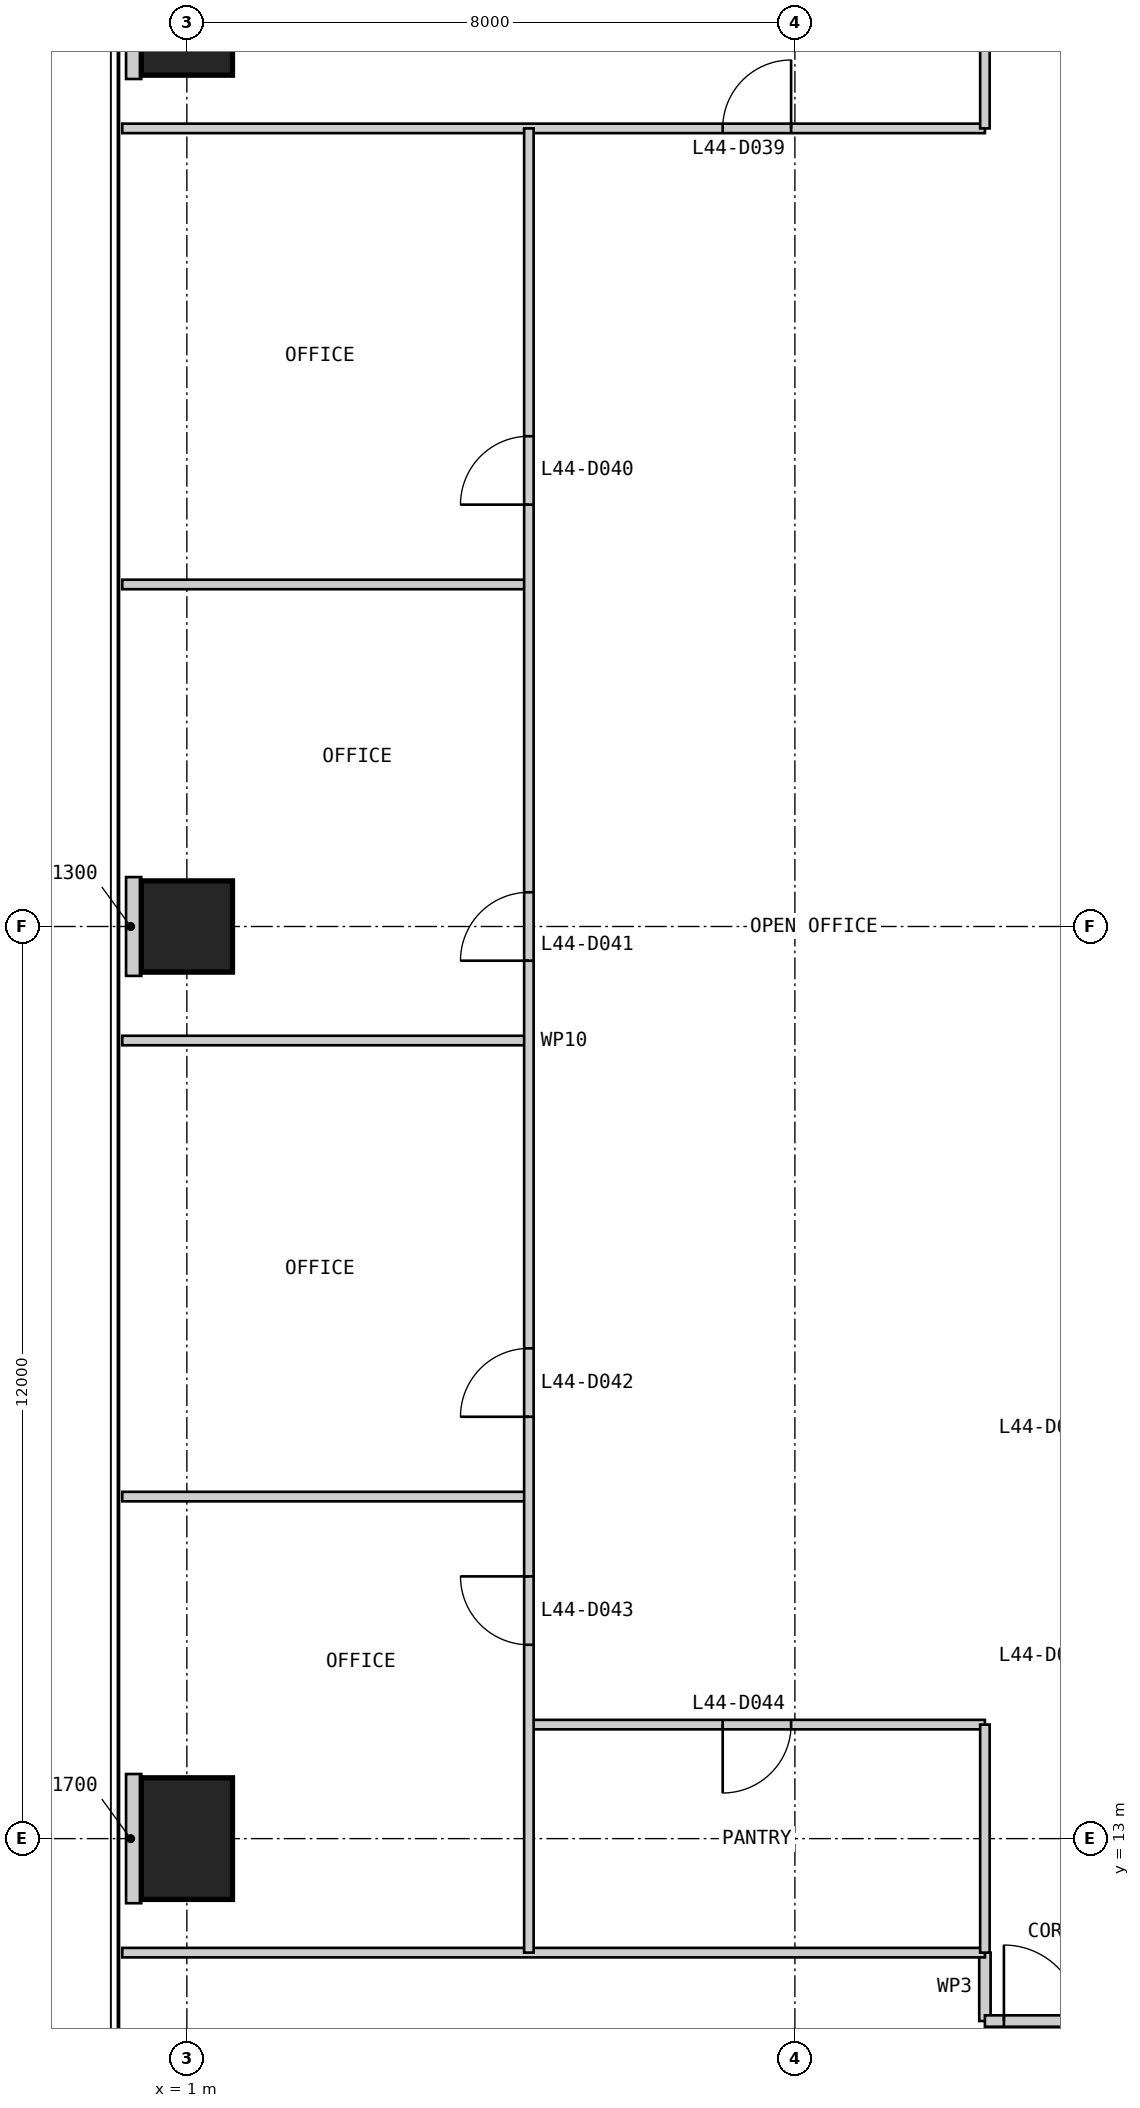
"""IFC4 building model, lengths in metres.
Left out: names, types, materials, properties, quantities, classifications, styles, units other than length and angle.
Written with IfcOpenShell. Run it as: python <this file> out.ifc"""

import sys

from ifc_helpers import new_model, si_unit, direction, frame, frame_2d, origin, origin_2d, place, context, subcontext, project, spatial, rectangle, extrude, element, fill, save


model = new_model("IFC4")
c1 = context("Model", 3, precision=1e-05, world=origin(), true_north=direction((0.0, 1.0)))
c2 = subcontext(c1, "Body", "Model", "MODEL_VIEW")
j1 = project(units=[si_unit("LENGTHUNIT", "METRE"), si_unit("PLANEANGLEUNIT", "RADIAN")], contexts=[c1])
p1 = place(None, origin())
s1 = spatial("IfcSite", under=j1, at=p1, CompositionType="ELEMENT")
p2 = place(p1, origin())
s2 = spatial("IfcBuilding", under=s1, at=p2, CompositionType="ELEMENT")
p3 = place(p2, frame((0.0, 0.0, 189.8)))
s3 = spatial("IfcBuildingStorey", under=s2, at=p3, CompositionType="ELEMENT", Elevation=189.8)
p4 = place(p3, frame((1.0, 37.0, 0.0), z_axis=(0.0, 0.0, 1.0), x_axis=(1.0, 0.0, 0.0)))
e1 = element("IfcColumn", 1, at=p4, inside=s3, PredefinedType="COLUMN", context=c2, shape_type="SweptSolid", body=[
    extrude(rectangle(XDim=1.2, YDim=1.6, at=origin_2d()), origin(), (0.0, 0.0, 1.0), 4.0),
])
p5 = place(p3, frame((1.0, 25.0, 0.0), z_axis=(0.0, 0.0, 1.0), x_axis=(1.0, 0.0, 0.0)))
e2 = element("IfcColumn", 2, at=p5, inside=s3, PredefinedType="COLUMN", context=c2, shape_type="SweptSolid", body=[
    extrude(rectangle(XDim=1.2, YDim=1.2, at=origin_2d()), origin(), (0.0, 0.0, 1.0), 4.0),
])
p6 = place(p3, frame((1.0, 13.0, 0.0), z_axis=(0.0, 0.0, 1.0), x_axis=(1.0, 0.0, 0.0)))
e3 = element("IfcColumn", 3, at=p6, inside=s3, PredefinedType="COLUMN", context=c2, shape_type="SweptSolid", body=[
    extrude(rectangle(XDim=1.2, YDim=1.6, at=origin_2d()), origin(), (0.0, 0.0, 1.0), 4.0),
])
p7 = place(p3, frame((11.5, 11.5, 0.0), z_axis=(0.0, 0.0, 1.0), x_axis=(0.0, -1.0, 0.0)))
e4 = element("IfcWall", 4, at=p7, inside=s3, PredefinedType="PARTITIONING", context=c2, shape_type="SweptSolid", body=[
    extrude(rectangle(XDim=0.9, YDim=0.15, at=frame_2d((0.45, 0.0))), origin(), (0.0, 0.0, 1.0), 3.85),
])
p8 = place(p3, frame((11.5, 10.6, 0.0), z_axis=(0.0, 0.0, 1.0), x_axis=(1.0, 0.0, 0.0)))
e5 = element("IfcWall", 5, at=p8, inside=s3, PredefinedType="PARTITIONING", context=c2, shape_type="SweptSolid", body=[
    extrude(rectangle(XDim=27.0, YDim=0.15, at=frame_2d((13.5, 0.0))), origin(), (0.0, 0.0, 1.0), 3.85),
])
p9 = place(p8, frame((12.25, 0.0, 0.0)))
e6 = element("IfcOpeningElement", 6, at=p9, cuts=e5, PredefinedType="OPENING", context=c2, shape_type="SweptSolid", body=[
    extrude(rectangle(XDim=1.0, YDim=2.2, at=frame_2d((0.5, 1.1))), frame((0.0, 0.085, 0.0), z_axis=(0.0, -1.0, 0.0), x_axis=(1.0, 0.0, 0.0)), (0.0, 0.0, 1.0), 0.17),
])
p10 = place(p8, frame((19.75, 0.0, 0.0)))
e7 = element("IfcOpeningElement", 7, at=p10, cuts=e5, PredefinedType="OPENING", context=c2, shape_type="SweptSolid", body=[
    extrude(rectangle(XDim=1.0, YDim=2.2, at=frame_2d((0.5, 1.1))), frame((0.0, 0.085, 0.0), z_axis=(0.0, -1.0, 0.0), x_axis=(1.0, 0.0, 0.0)), (0.0, 0.0, 1.0), 0.17),
])
p11 = place(p8, frame((0.25, 0.0, 0.0)))
e8 = element("IfcOpeningElement", 8, at=p11, cuts=e5, PredefinedType="OPENING", context=c2, shape_type="SweptSolid", body=[
    extrude(rectangle(XDim=1.0, YDim=2.2, at=frame_2d((0.5, 1.1))), frame((0.0, 0.085, 0.0), z_axis=(0.0, -1.0, 0.0), x_axis=(1.0, 0.0, 0.0)), (0.0, 0.0, 1.0), 0.17),
])
p12 = place(p8, frame((10.75, 0.0, 0.0)))
e9 = element("IfcOpeningElement", 9, at=p12, cuts=e5, PredefinedType="OPENING", context=c2, shape_type="SweptSolid", body=[
    extrude(rectangle(XDim=1.0, YDim=2.2, at=frame_2d((0.5, 1.1))), frame((0.0, 0.085, 0.0), z_axis=(0.0, -1.0, 0.0), x_axis=(1.0, 0.0, 0.0)), (0.0, 0.0, 1.0), 0.17),
])
p13 = place(p8, frame((22.0, 0.0, 0.0)))
e10 = element("IfcOpeningElement", 10, at=p13, cuts=e5, PredefinedType="OPENING", context=c2, shape_type="SweptSolid", body=[
    extrude(rectangle(XDim=1.0, YDim=2.2, at=frame_2d((0.5, 1.1))), frame((0.0, 0.085, 0.0), z_axis=(0.0, -1.0, 0.0), x_axis=(1.0, 0.0, 0.0)), (0.0, 0.0, 1.0), 0.17),
])
p14 = place(p8, frame((25.0, 0.0, 0.0)))
e11 = element("IfcOpeningElement", 11, at=p14, cuts=e5, PredefinedType="OPENING", context=c2, shape_type="SweptSolid", body=[
    extrude(rectangle(XDim=1.0, YDim=2.2, at=frame_2d((0.5, 1.1))), frame((0.0, 0.085, 0.0), z_axis=(0.0, -1.0, 0.0), x_axis=(1.0, 0.0, 0.0)), (0.0, 0.0, 1.0), 0.17),
])
p15 = place(p3, frame((0.15, 11.5, 0.0), z_axis=(0.0, 0.0, 1.0), x_axis=(1.0, 0.0, 0.0)))
e12 = element("IfcWall", 12, at=p15, inside=s3, PredefinedType="PARTITIONING", context=c2, shape_type="SweptSolid", body=[
    extrude(rectangle(XDim=11.35, YDim=0.125, at=frame_2d((5.675, 0.0))), origin(), (0.0, 0.0, 1.0), 3.85),
])
p16 = place(p3, frame((0.15, 35.5, 0.0), z_axis=(0.0, 0.0, 1.0), x_axis=(1.0, 0.0, 0.0)))
e13 = element("IfcWall", 13, at=p16, inside=s3, PredefinedType="PARTITIONING", context=c2, shape_type="SweptSolid", body=[
    extrude(rectangle(XDim=11.35, YDim=0.125, at=frame_2d((5.675, 0.0))), origin(), (0.0, 0.0, 1.0), 3.85),
])
p17 = place(p16, frame((7.9, 0.0, 0.0)))
e14 = element("IfcOpeningElement", 14, at=p17, cuts=e13, PredefinedType="OPENING", context=c2, shape_type="SweptSolid", body=[
    extrude(rectangle(XDim=0.9, YDim=2.2, at=frame_2d((0.45, 1.1))), frame((0.0, 0.073, 0.0), z_axis=(0.0, -1.0, 0.0), x_axis=(1.0, 0.0, 0.0)), (0.0, 0.0, 1.0), 0.145),
])
for number, where, z_axis, x_axis in (
    (15, (0.15, 29.5, 0.0), (0.0, 0.0, 1.0), (1.0, 0.0, 0.0)),
    (16, (0.15, 23.5, 0.0), (0.0, 0.0, 1.0), (1.0, 0.0, 0.0)),
    (17, (0.15, 17.5, 0.0), (0.0, 0.0, 1.0), (1.0, 0.0, 0.0)),
):
    element("IfcWall", number, at=place(p3, frame(where, z_axis=z_axis, x_axis=x_axis)), inside=s3, PredefinedType="PARTITIONING", context=c2, shape_type="SweptSolid", body=[
        extrude(rectangle(XDim=5.35, YDim=0.125, at=frame_2d((2.675, 0.0))), origin(), (0.0, 0.0, 1.0), 3.85),
    ])
p18 = place(p3, frame((5.5, 14.5, 0.0), z_axis=(0.0, 0.0, 1.0), x_axis=(1.0, 0.0, 0.0)))
e18 = element("IfcWall", 18, at=p18, inside=s3, PredefinedType="PARTITIONING", context=c2, shape_type="SweptSolid", body=[
    extrude(rectangle(XDim=6.0, YDim=0.125, at=frame_2d((3.0, 0.0))), origin(), (0.0, 0.0, 1.0), 3.85),
])
p19 = place(p18, frame((2.55, 0.0, 0.0)))
e19 = element("IfcOpeningElement", 19, at=p19, cuts=e18, PredefinedType="OPENING", context=c2, shape_type="SweptSolid", body=[
    extrude(rectangle(XDim=0.9, YDim=2.2, at=frame_2d((0.45, 1.1))), frame((0.0, 0.073, 0.0), z_axis=(0.0, -1.0, 0.0), x_axis=(1.0, 0.0, 0.0)), (0.0, 0.0, 1.0), 0.145),
])
p20 = place(p3, frame((5.5, 35.5, 0.0), z_axis=(0.0, 0.0, 1.0), x_axis=(0.0, -1.0, 0.0)))
e20 = element("IfcWall", 20, at=p20, inside=s3, PredefinedType="PARTITIONING", context=c2, shape_type="SweptSolid", body=[
    extrude(rectangle(XDim=24.0, YDim=0.125, at=frame_2d((12.0, 0.0))), origin(), (0.0, 0.0, 1.0), 3.85),
])
p21 = place(p20, frame((4.05, 0.0, 0.0)))
e21 = element("IfcOpeningElement", 21, at=p21, cuts=e20, PredefinedType="OPENING", context=c2, shape_type="SweptSolid", body=[
    extrude(rectangle(XDim=0.9, YDim=2.2, at=frame_2d((0.45, 1.1))), frame((0.0, 0.073, 0.0), z_axis=(0.0, -1.0, 0.0), x_axis=(1.0, 0.0, 0.0)), (0.0, 0.0, 1.0), 0.145),
])
p22 = place(p20, frame((10.05, 0.0, 0.0)))
e22 = element("IfcOpeningElement", 22, at=p22, cuts=e20, PredefinedType="OPENING", context=c2, shape_type="SweptSolid", body=[
    extrude(rectangle(XDim=0.9, YDim=2.2, at=frame_2d((0.45, 1.1))), frame((0.0, 0.073, 0.0), z_axis=(0.0, -1.0, 0.0), x_axis=(1.0, 0.0, 0.0)), (0.0, 0.0, 1.0), 0.145),
])
p23 = place(p20, frame((16.05, 0.0, 0.0)))
e23 = element("IfcOpeningElement", 23, at=p23, cuts=e20, PredefinedType="OPENING", context=c2, shape_type="SweptSolid", body=[
    extrude(rectangle(XDim=0.9, YDim=2.2, at=frame_2d((0.45, 1.1))), frame((0.0, 0.073, 0.0), z_axis=(0.0, -1.0, 0.0), x_axis=(1.0, 0.0, 0.0)), (0.0, 0.0, 1.0), 0.145),
])
p24 = place(p20, frame((19.05, 0.0, 0.0)))
e24 = element("IfcOpeningElement", 24, at=p24, cuts=e20, PredefinedType="OPENING", context=c2, shape_type="SweptSolid", body=[
    extrude(rectangle(XDim=0.9, YDim=2.2, at=frame_2d((0.45, 1.1))), frame((0.0, 0.073, 0.0), z_axis=(0.0, -1.0, 0.0), x_axis=(1.0, 0.0, 0.0)), (0.0, 0.0, 1.0), 0.145),
])
for number, where, z_axis, x_axis in (
    (25, (11.5, 38.5, 0.0), (0.0, 0.0, 1.0), (0.0, -1.0, 0.0)),
    (26, (11.5, 14.5, 0.0), (0.0, 0.0, 1.0), (0.0, -1.0, 0.0)),
):
    element("IfcWall", number, at=place(p3, frame(where, z_axis=z_axis, x_axis=x_axis)), inside=s3, PredefinedType="PARTITIONING", context=c2, shape_type="SweptSolid", body=[
        extrude(rectangle(XDim=3.0, YDim=0.125, at=frame_2d((1.5, 0.0))), origin(), (0.0, 0.0, 1.0), 3.85),
    ])
p25 = place(p3, frame((0.2, 37.0, 0.0), z_axis=(0.0, 0.0, 1.0), x_axis=(1.0, 0.0, 0.0)))
e27 = element("IfcWall", 27, at=p25, inside=s3, PredefinedType="PARTITIONING", context=c2, shape_type="SweptSolid", body=[
    extrude(rectangle(XDim=0.2, YDim=1.7, at=frame_2d((0.1, 0.0))), origin(), (0.0, 0.0, 1.0), 3.85),
])
p26 = place(p3, frame((0.2, 25.0, 0.0), z_axis=(0.0, 0.0, 1.0), x_axis=(1.0, 0.0, 0.0)))
e28 = element("IfcWall", 28, at=p26, inside=s3, PredefinedType="PARTITIONING", context=c2, shape_type="SweptSolid", body=[
    extrude(rectangle(XDim=0.2, YDim=1.3, at=frame_2d((0.1, 0.0))), origin(), (0.0, 0.0, 1.0), 3.85),
])
p27 = place(p3, frame((0.2, 13.0, 0.0), z_axis=(0.0, 0.0, 1.0), x_axis=(1.0, 0.0, 0.0)))
e29 = element("IfcWall", 29, at=p27, inside=s3, PredefinedType="PARTITIONING", context=c2, shape_type="SweptSolid", body=[
    extrude(rectangle(XDim=0.2, YDim=1.7, at=frame_2d((0.1, 0.0))), origin(), (0.0, 0.0, 1.0), 3.85),
])
p28 = place(p11, origin())
e30 = element("IfcDoor", 30, at=p28, inside=s3, OperationType="SINGLE_SWING_LEFT", PredefinedType="DOOR", context=c2, shape_type="SweptSolid", body=[
    extrude(rectangle(XDim=1.0, YDim=2.2, at=frame_2d((0.5, 1.1))), frame((0.0, 0.025, 0.0), z_axis=(0.0, -1.0, 0.0), x_axis=(1.0, 0.0, 0.0)), (0.0, 0.0, 1.0), 0.05),
])
fill(e8, e30)
p29 = place(p17, origin())
e31 = element("IfcDoor", 31, at=p29, inside=s3, OperationType="SINGLE_SWING_RIGHT", PredefinedType="DOOR", context=c2, shape_type="SweptSolid", body=[
    extrude(rectangle(XDim=0.9, YDim=2.2, at=frame_2d((0.45, 1.1))), frame((0.0, 0.025, 0.0), z_axis=(0.0, -1.0, 0.0), x_axis=(1.0, 0.0, 0.0)), (0.0, 0.0, 1.0), 0.05),
])
fill(e14, e31)
p30 = place(p21, frame((0.9, 0.0, 0.0), z_axis=(0.0, 0.0, 1.0), x_axis=(-1.0, 0.0, 0.0)))
e32 = element("IfcDoor", 32, at=p30, inside=s3, OperationType="SINGLE_SWING_LEFT", PredefinedType="DOOR", context=c2, shape_type="SweptSolid", body=[
    extrude(rectangle(XDim=0.9, YDim=2.2, at=frame_2d((0.45, 1.1))), frame((0.0, 0.025, 0.0), z_axis=(0.0, -1.0, 0.0), x_axis=(1.0, 0.0, 0.0)), (0.0, 0.0, 1.0), 0.05),
])
fill(e21, e32)
p31 = place(p22, frame((0.9, 0.0, 0.0), z_axis=(0.0, 0.0, 1.0), x_axis=(-1.0, 0.0, 0.0)))
e33 = element("IfcDoor", 33, at=p31, inside=s3, OperationType="SINGLE_SWING_LEFT", PredefinedType="DOOR", context=c2, shape_type="SweptSolid", body=[
    extrude(rectangle(XDim=0.9, YDim=2.2, at=frame_2d((0.45, 1.1))), frame((0.0, 0.025, 0.0), z_axis=(0.0, -1.0, 0.0), x_axis=(1.0, 0.0, 0.0)), (0.0, 0.0, 1.0), 0.05),
])
fill(e22, e33)
p32 = place(p23, frame((0.9, 0.0, 0.0), z_axis=(0.0, 0.0, 1.0), x_axis=(-1.0, 0.0, 0.0)))
e34 = element("IfcDoor", 34, at=p32, inside=s3, OperationType="SINGLE_SWING_LEFT", PredefinedType="DOOR", context=c2, shape_type="SweptSolid", body=[
    extrude(rectangle(XDim=0.9, YDim=2.2, at=frame_2d((0.45, 1.1))), frame((0.0, 0.025, 0.0), z_axis=(0.0, -1.0, 0.0), x_axis=(1.0, 0.0, 0.0)), (0.0, 0.0, 1.0), 0.05),
])
fill(e23, e34)
p33 = place(p24, frame((0.9, 0.0, 0.0), z_axis=(0.0, 0.0, 1.0), x_axis=(-1.0, 0.0, 0.0)))
e35 = element("IfcDoor", 35, at=p33, inside=s3, OperationType="SINGLE_SWING_RIGHT", PredefinedType="DOOR", context=c2, shape_type="SweptSolid", body=[
    extrude(rectangle(XDim=0.9, YDim=2.2, at=frame_2d((0.45, 1.1))), frame((0.0, 0.025, 0.0), z_axis=(0.0, -1.0, 0.0), x_axis=(1.0, 0.0, 0.0)), (0.0, 0.0, 1.0), 0.05),
])
fill(e24, e35)
p34 = place(p19, frame((0.9, 0.0, 0.0), z_axis=(0.0, 0.0, 1.0), x_axis=(-1.0, 0.0, 0.0)))
e36 = element("IfcDoor", 36, at=p34, inside=s3, OperationType="SINGLE_SWING_RIGHT", PredefinedType="DOOR", context=c2, shape_type="SweptSolid", body=[
    extrude(rectangle(XDim=0.9, YDim=2.2, at=frame_2d((0.45, 1.1))), frame((0.0, 0.025, 0.0), z_axis=(0.0, -1.0, 0.0), x_axis=(1.0, 0.0, 0.0)), (0.0, 0.0, 1.0), 0.05),
])
fill(e19, e36)
save(model, sys.argv[1])
